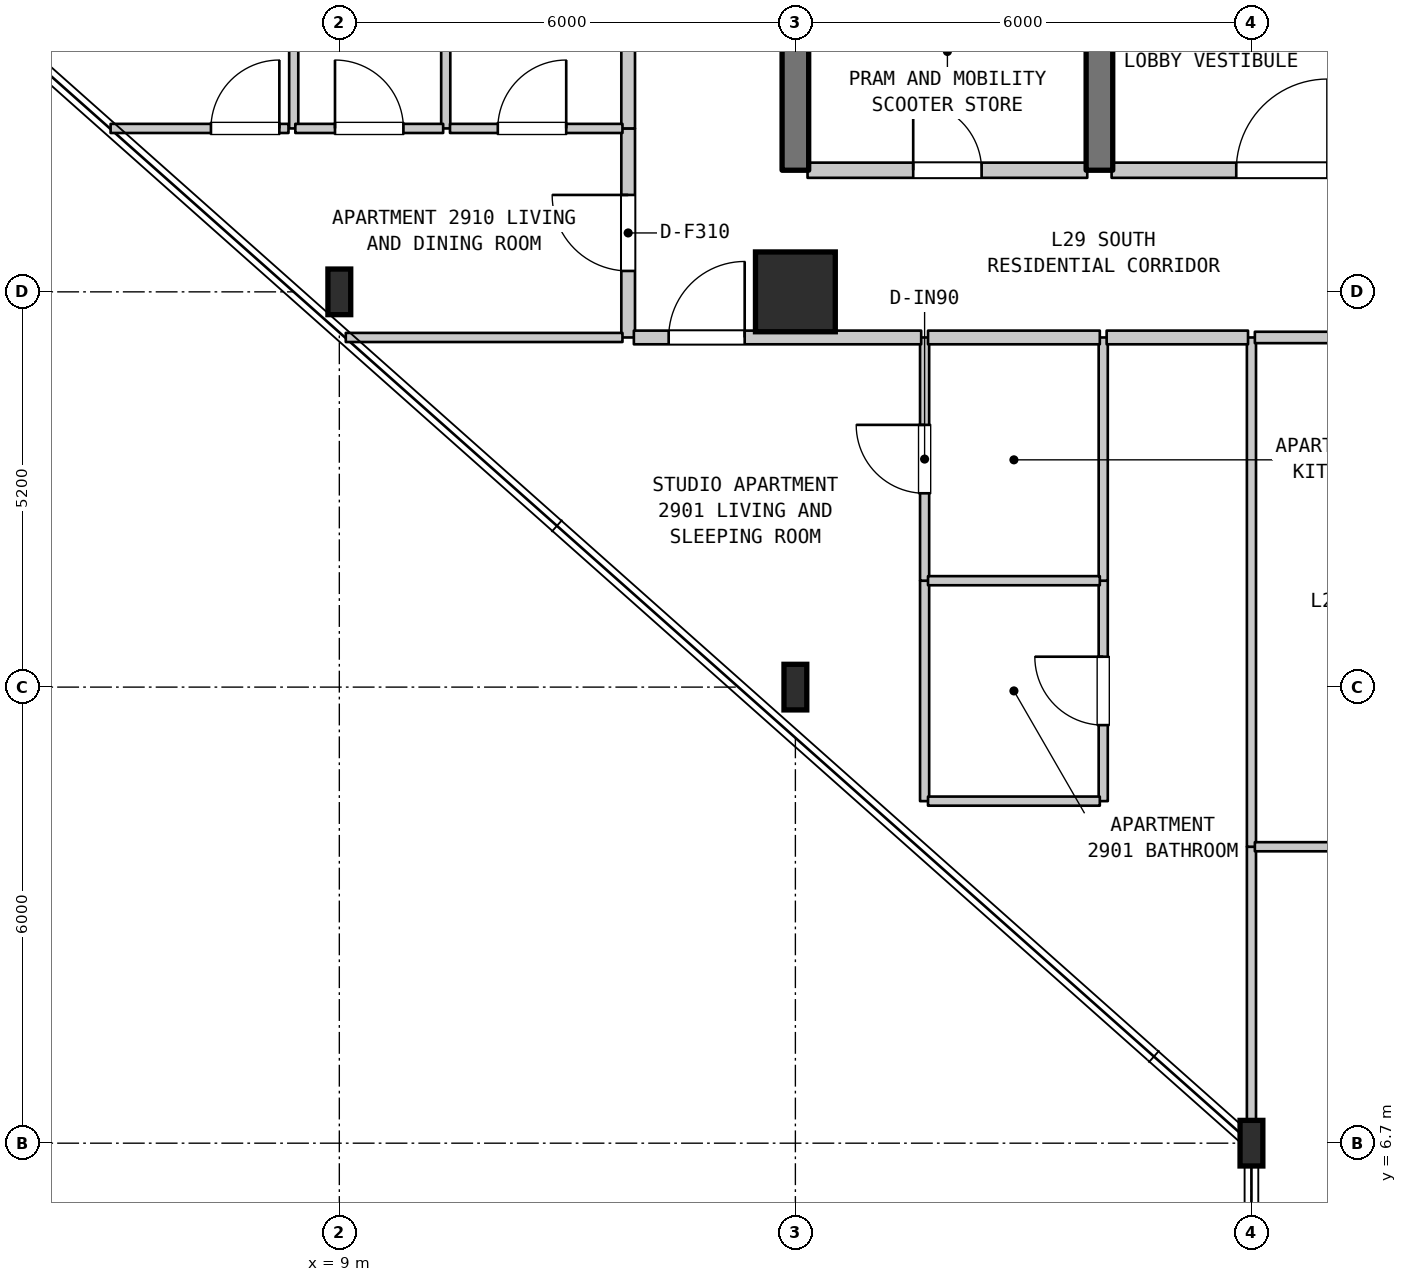
"""IFC4 building model, lengths in metres.
Left out: names, types, materials, properties, quantities, classifications, styles, units other than length and angle.
Written with IfcOpenShell. Run it as: python <this file> out.ifc"""

import sys

from ifc_helpers import new_model, si_unit, direction, frame, frame_2d, origin, origin_2d, place, context, subcontext, project, spatial, rectangle, i_section, extrude, element, fill, save


model = new_model("IFC4")
c1 = context("Model", 3, precision=1e-05, world=origin(), true_north=direction((0.0, 1.0)))
c2 = subcontext(c1, "Body", "Model", "MODEL_VIEW")
j1 = project(units=[si_unit("LENGTHUNIT", "METRE"), si_unit("PLANEANGLEUNIT", "RADIAN")], contexts=[c1])
p1 = place(None, origin())
s1 = spatial("IfcSite", under=j1, at=p1, CompositionType="ELEMENT")
p2 = place(p1, origin())
s2 = spatial("IfcBuilding", under=s1, at=p2, CompositionType="ELEMENT")
p3 = place(p2, frame((0.0, 0.0, 120.5)))
s3 = spatial("IfcBuildingStorey", under=s2, at=p3, CompositionType="ELEMENT", Elevation=120.5)
for number, where, z_axis, x_axis in (
    (1, (9.0, 17.9, 0.0), (0.0, 0.0, 1.0), (1.0, 0.0, 0.0)),
    (2, (15.0, 12.7, 0.0), (0.0, 0.0, 1.0), (1.0, 0.0, 0.0)),
):
    element("IfcColumn", number, at=place(p3, frame(where, z_axis=z_axis, x_axis=x_axis)), inside=s3, PredefinedType="COLUMN", context=c2, shape_type="SweptSolid", body=[
        extrude(i_section(OverallWidth=0.3, OverallDepth=0.6, WebThickness=0.015, FlangeThickness=0.03, FilletRadius=0.027, at=origin_2d()), origin(), (0.0, 0.0, 1.0), 4.8),
    ])
p4 = place(p3, frame((15.0, 17.9, 0.0), z_axis=(0.0, 0.0, 1.0), x_axis=(1.0, 0.0, 0.0)))
e3 = element("IfcColumn", 3, at=p4, inside=s3, PredefinedType="COLUMN", context=c2, shape_type="SweptSolid", body=[
    extrude(rectangle(XDim=1.05, YDim=1.05, at=origin_2d()), origin(), (0.0, 0.0, 1.0), 4.8),
])
p5 = place(p3, frame((21.0, 6.7, 0.0), z_axis=(0.0, 0.0, 1.0), x_axis=(1.0, 0.0, 0.0)))
e4 = element("IfcColumn", 4, at=p5, inside=s3, PredefinedType="COLUMN", context=c2, shape_type="SweptSolid", body=[
    extrude(i_section(OverallWidth=0.3, OverallDepth=0.6, WebThickness=0.015, FlangeThickness=0.03, FilletRadius=0.027, at=origin_2d()), origin(), (0.0, 0.0, 1.0), 4.8),
])
for number, where, z_axis, x_axis in (
    (5, (8.4, 20.05, 0.0), (0.0, 0.0, 1.0), (0.0, 1.0, 0.0)),
    (6, (10.4, 20.05, 0.0), (0.0, 0.0, 1.0), (0.0, 1.0, 0.0)),
):
    element("IfcWall", number, at=place(p3, frame(where, z_axis=z_axis, x_axis=x_axis)), inside=s3, PredefinedType="PARTITIONING", context=c2, shape_type="SweptSolid", body=[
        extrude(rectangle(XDim=5.46, YDim=0.12, at=frame_2d((2.73, 0.0))), origin(), (0.0, 0.0, 1.0), 4.48),
    ])
p6 = place(p3, frame((12.8, 17.3, 0.0), z_axis=(0.0, 0.0, 1.0), x_axis=(0.0, 1.0, 0.0)))
e7 = element("IfcWall", 7, at=p6, inside=s3, PredefinedType="STANDARD", context=c2, shape_type="SweptSolid", body=[
    extrude(rectangle(XDim=2.75, YDim=0.18, at=frame_2d((1.375, 0.0))), origin(), (0.0, 0.0, 1.0), 4.48),
])
p7 = place(p6, frame((0.875, 0.0, 0.0)))
e8 = element("IfcOpeningElement", 8, at=p7, cuts=e7, PredefinedType="OPENING", context=c2, shape_type="SweptSolid", body=[
    extrude(rectangle(XDim=1.0, YDim=2.15, at=frame_2d((0.5, 1.075))), frame((0.0, 0.1, 0.0), z_axis=(0.0, -1.0, 0.0), x_axis=(1.0, 0.0, 0.0)), (0.0, 0.0, 1.0), 0.2),
])
p8 = place(p3, frame((12.8, 20.05, 0.0), z_axis=(0.0, 0.0, 1.0), x_axis=(0.0, 1.0, 0.0)))
e9 = element("IfcWall", 9, at=p8, inside=s3, PredefinedType="STANDARD", context=c2, shape_type="SweptSolid", body=[
    extrude(rectangle(XDim=5.46, YDim=0.18, at=frame_2d((2.73, 0.0))), origin(), (0.0, 0.0, 1.0), 4.48),
])
p9 = place(p3, frame((15.0, 19.5, 0.0), z_axis=(0.0, 0.0, 1.0), x_axis=(0.0, 1.0, 0.0)))
e10 = element("IfcWall", 10, at=p9, inside=s3, PredefinedType="SHEAR", context=c2, shape_type="SweptSolid", body=[
    extrude(rectangle(XDim=3.2, YDim=0.35, at=frame_2d((1.6, 0.0))), origin(), (0.0, 0.0, 1.0), 4.48),
])
p10 = place(p3, frame((16.7, 11.2, 0.0), z_axis=(0.0, 0.0, 1.0), x_axis=(0.0, 1.0, 0.0)))
e11 = element("IfcWall", 11, at=p10, inside=s3, PredefinedType="PARTITIONING", context=c2, shape_type="SweptSolid", body=[
    extrude(rectangle(XDim=2.9, YDim=0.12, at=frame_2d((1.45, 0.0))), origin(), (0.0, 0.0, 1.0), 4.48),
])
p11 = place(p3, frame((16.7, 14.1, 0.0), z_axis=(0.0, 0.0, 1.0), x_axis=(0.0, 1.0, 0.0)))
e12 = element("IfcWall", 12, at=p11, inside=s3, PredefinedType="PARTITIONING", context=c2, shape_type="SweptSolid", body=[
    extrude(rectangle(XDim=3.2, YDim=0.12, at=frame_2d((1.6, 0.0))), origin(), (0.0, 0.0, 1.0), 4.48),
])
p12 = place(p11, frame((1.15, 0.0, 0.0)))
e13 = element("IfcOpeningElement", 13, at=p12, cuts=e12, PredefinedType="OPENING", context=c2, shape_type="SweptSolid", body=[
    extrude(rectangle(XDim=0.9, YDim=2.15, at=frame_2d((0.45, 1.075))), frame((0.0, 0.07, 0.0), z_axis=(0.0, -1.0, 0.0), x_axis=(1.0, 0.0, 0.0)), (0.0, 0.0, 1.0), 0.14),
])
p13 = place(p3, frame((19.0, 19.5, 0.0), z_axis=(0.0, 0.0, 1.0), x_axis=(0.0, 1.0, 0.0)))
e14 = element("IfcWall", 14, at=p13, inside=s3, PredefinedType="SHEAR", context=c2, shape_type="SweptSolid", body=[
    extrude(rectangle(XDim=3.2, YDim=0.35, at=frame_2d((1.6, 0.0))), origin(), (0.0, 0.0, 1.0), 4.48),
])
p14 = place(p3, frame((19.05, 11.2, 0.0), z_axis=(0.0, 0.0, 1.0), x_axis=(0.0, 1.0, 0.0)))
e15 = element("IfcWall", 15, at=p14, inside=s3, PredefinedType="PARTITIONING", context=c2, shape_type="SweptSolid", body=[
    extrude(rectangle(XDim=2.9, YDim=0.12, at=frame_2d((1.45, 0.0))), origin(), (0.0, 0.0, 1.0), 4.48),
])
p15 = place(p14, frame((1.0, 0.0, 0.0)))
e16 = element("IfcOpeningElement", 16, at=p15, cuts=e15, PredefinedType="OPENING", context=c2, shape_type="SweptSolid", body=[
    extrude(rectangle(XDim=0.9, YDim=2.1, at=frame_2d((0.45, 1.05))), frame((0.0, 0.07, 0.0), z_axis=(0.0, -1.0, 0.0), x_axis=(1.0, 0.0, 0.0)), (0.0, 0.0, 1.0), 0.14),
])
p16 = place(p3, frame((19.05, 14.1, 0.0), z_axis=(0.0, 0.0, 1.0), x_axis=(0.0, 1.0, 0.0)))
e17 = element("IfcWall", 17, at=p16, inside=s3, PredefinedType="PARTITIONING", context=c2, shape_type="SweptSolid", body=[
    extrude(rectangle(XDim=3.2, YDim=0.12, at=frame_2d((1.6, 0.0))), origin(), (0.0, 0.0, 1.0), 4.48),
])
p17 = place(p3, frame((21.0, 6.71, 0.0), z_axis=(0.0, 0.0, 1.0), x_axis=(0.0, 1.0, 0.0)))
e18 = element("IfcWall", 18, at=p17, inside=s3, PredefinedType="PARTITIONING", context=c2, shape_type="SweptSolid", body=[
    extrude(rectangle(XDim=3.89, YDim=0.12, at=frame_2d((1.945, 0.0))), origin(), (0.0, 0.0, 1.0), 4.48),
])
p18 = place(p3, frame((21.0, 10.6, 0.0), z_axis=(0.0, 0.0, 1.0), x_axis=(0.0, 1.0, 0.0)))
e19 = element("IfcWall", 19, at=p18, inside=s3, PredefinedType="PARTITIONING", context=c2, shape_type="SweptSolid", body=[
    extrude(rectangle(XDim=6.7, YDim=0.12, at=frame_2d((3.35, 0.0))), origin(), (0.0, 0.0, 1.0), 4.48),
])
p19 = place(p3, frame((21.045, 10.6, 0.0), z_axis=(0.0, 0.0, 1.0), x_axis=(1.0, 0.0, 0.0)))
e20 = element("IfcWall", 20, at=p19, inside=s3, PredefinedType="PARTITIONING", context=c2, shape_type="SweptSolid", body=[
    extrude(rectangle(XDim=3.91, YDim=0.12, at=frame_2d((1.955, 0.0))), origin(), (0.0, 0.0, 1.0), 4.48),
])
for number, where, z_axis, x_axis in (
    (21, (16.745, 11.2, 0.0), (0.0, 0.0, 1.0), (1.0, 0.0, 0.0)),
    (22, (16.745, 14.1, 0.0), (0.0, 0.0, 1.0), (1.0, 0.0, 0.0)),
):
    element("IfcWall", number, at=place(p3, frame(where, z_axis=z_axis, x_axis=x_axis)), inside=s3, PredefinedType="PARTITIONING", context=c2, shape_type="SweptSolid", body=[
        extrude(rectangle(XDim=2.26, YDim=0.12, at=frame_2d((1.13, 0.0))), origin(), (0.0, 0.0, 1.0), 4.48),
    ])
p20 = place(p3, frame((9.085, 17.3, 0.0), z_axis=(0.0, 0.0, 1.0), x_axis=(1.0, 0.0, 0.0)))
e23 = element("IfcWall", 23, at=p20, inside=s3, PredefinedType="PARTITIONING", context=c2, shape_type="SweptSolid", body=[
    extrude(rectangle(XDim=3.64, YDim=0.12, at=frame_2d((1.82, 0.0))), origin(), (0.0, 0.0, 1.0), 4.48),
])
p21 = place(p3, frame((12.875, 17.3, 0.0), z_axis=(0.0, 0.0, 1.0), x_axis=(1.0, 0.0, 0.0)))
e24 = element("IfcWall", 24, at=p21, inside=s3, PredefinedType="STANDARD", context=c2, shape_type="SweptSolid", body=[
    extrude(rectangle(XDim=3.78, YDim=0.18, at=frame_2d((1.89, 0.0))), origin(), (0.0, 0.0, 1.0), 4.48),
])
p22 = place(p21, frame((0.458, 0.0, 0.0)))
e25 = element("IfcOpeningElement", 25, at=p22, cuts=e24, PredefinedType="OPENING", context=c2, shape_type="SweptSolid", body=[
    extrude(rectangle(XDim=1.0, YDim=2.15, at=frame_2d((0.5, 1.075))), frame((0.0, 0.1, 0.0), z_axis=(0.0, -1.0, 0.0), x_axis=(1.0, 0.0, 0.0)), (0.0, 0.0, 1.0), 0.2),
])
p23 = place(p3, frame((16.745, 17.3, 0.0), z_axis=(0.0, 0.0, 1.0), x_axis=(1.0, 0.0, 0.0)))
e26 = element("IfcWall", 26, at=p23, inside=s3, PredefinedType="STANDARD", context=c2, shape_type="SweptSolid", body=[
    extrude(rectangle(XDim=2.26, YDim=0.18, at=frame_2d((1.13, 0.0))), origin(), (0.0, 0.0, 1.0), 4.48),
])
p24 = place(p3, frame((19.095, 17.3, 0.0), z_axis=(0.0, 0.0, 1.0), x_axis=(1.0, 0.0, 0.0)))
e27 = element("IfcWall", 27, at=p24, inside=s3, PredefinedType="STANDARD", context=c2, shape_type="SweptSolid", body=[
    extrude(rectangle(XDim=1.86, YDim=0.18, at=frame_2d((0.93, 0.0))), origin(), (0.0, 0.0, 1.0), 4.48),
])
p25 = place(p3, frame((21.045, 17.3, 0.0), z_axis=(0.0, 0.0, 1.0), x_axis=(1.0, 0.0, 0.0)))
e28 = element("IfcWall", 28, at=p25, inside=s3, PredefinedType="STANDARD", context=c2, shape_type="SweptSolid", body=[
    extrude(rectangle(XDim=3.91, YDim=0.15, at=frame_2d((1.955, 0.0))), origin(), (0.0, 0.0, 1.0), 4.48),
])
p26 = place(p25, frame((1.455, 0.0, 0.0)))
e29 = element("IfcOpeningElement", 29, at=p26, cuts=e28, PredefinedType="OPENING", context=c2, shape_type="SweptSolid", body=[
    extrude(rectangle(XDim=1.0, YDim=2.15, at=frame_2d((0.5, 1.075))), frame((0.0, 0.085, 0.0), z_axis=(0.0, -1.0, 0.0), x_axis=(1.0, 0.0, 0.0)), (0.0, 0.0, 1.0), 0.17),
])
p27 = place(p3, frame((15.16, 19.5, 0.0), z_axis=(0.0, 0.0, 1.0), x_axis=(1.0, 0.0, 0.0)))
e30 = element("IfcWall", 30, at=p27, inside=s3, PredefinedType="STANDARD", context=c2, shape_type="SweptSolid", body=[
    extrude(rectangle(XDim=3.68, YDim=0.2, at=frame_2d((1.84, 0.0))), origin(), (0.0, 0.0, 1.0), 4.48),
])
p28 = place(p27, frame((1.39, 0.0, 0.0)))
e31 = element("IfcOpeningElement", 31, at=p28, cuts=e30, PredefinedType="OPENING", context=c2, shape_type="SweptSolid", body=[
    extrude(rectangle(XDim=0.9, YDim=2.15, at=frame_2d((0.45, 1.075))), frame((0.0, 0.11, 0.0), z_axis=(0.0, -1.0, 0.0), x_axis=(1.0, 0.0, 0.0)), (0.0, 0.0, 1.0), 0.22),
])
p29 = place(p3, frame((19.16, 19.5, 0.0), z_axis=(0.0, 0.0, 1.0), x_axis=(1.0, 0.0, 0.0)))
e32 = element("IfcWall", 32, at=p29, inside=s3, PredefinedType="STANDARD", context=c2, shape_type="SweptSolid", body=[
    extrude(rectangle(XDim=4.48, YDim=0.2, at=frame_2d((2.24, 0.0))), origin(), (0.0, 0.0, 1.0), 4.48),
])
p30 = place(p29, frame((1.64, 0.0, 0.0)))
e33 = element("IfcOpeningElement", 33, at=p30, cuts=e32, PredefinedType="OPENING", context=c2, shape_type="SweptSolid", body=[
    extrude(rectangle(XDim=1.2, YDim=2.2, at=frame_2d((0.6, 1.1))), frame((0.0, 0.11, 0.0), z_axis=(0.0, -1.0, 0.0), x_axis=(1.0, 0.0, 0.0)), (0.0, 0.0, 1.0), 0.22),
])
p31 = place(p3, frame((5.991, 20.05, 0.0), z_axis=(0.0, 0.0, 1.0), x_axis=(1.0, 0.0, 0.0)))
e34 = element("IfcWall", 34, at=p31, inside=s3, PredefinedType="PARTITIONING", context=c2, shape_type="SweptSolid", body=[
    extrude(rectangle(XDim=2.34, YDim=0.12, at=frame_2d((1.17, 0.0))), origin(), (0.0, 0.0, 1.0), 4.48),
])
p32 = place(p31, frame((1.32, 0.0, 0.0)))
e35 = element("IfcOpeningElement", 35, at=p32, cuts=e34, PredefinedType="OPENING", context=c2, shape_type="SweptSolid", body=[
    extrude(rectangle(XDim=0.9, YDim=2.15, at=frame_2d((0.45, 1.075))), frame((0.0, 0.07, 0.0), z_axis=(0.0, -1.0, 0.0), x_axis=(1.0, 0.0, 0.0)), (0.0, 0.0, 1.0), 0.14),
])
p33 = place(p3, frame((8.421, 20.05, 0.0), z_axis=(0.0, 0.0, 1.0), x_axis=(1.0, 0.0, 0.0)))
e36 = element("IfcWall", 36, at=p33, inside=s3, PredefinedType="PARTITIONING", context=c2, shape_type="SweptSolid", body=[
    extrude(rectangle(XDim=1.945, YDim=0.12, at=frame_2d((0.973, 0.0))), origin(), (0.0, 0.0, 1.0), 4.48),
])
p34 = place(p33, frame((0.522, 0.0, 0.0)))
e37 = element("IfcOpeningElement", 37, at=p34, cuts=e36, PredefinedType="OPENING", context=c2, shape_type="SweptSolid", body=[
    extrude(rectangle(XDim=0.9, YDim=2.15, at=frame_2d((0.45, 1.075))), frame((0.0, 0.07, 0.0), z_axis=(0.0, -1.0, 0.0), x_axis=(1.0, 0.0, 0.0)), (0.0, 0.0, 1.0), 0.14),
])
p35 = place(p3, frame((10.456, 20.05, 0.0), z_axis=(0.0, 0.0, 1.0), x_axis=(1.0, 0.0, 0.0)))
e38 = element("IfcWall", 38, at=p35, inside=s3, PredefinedType="PARTITIONING", context=c2, shape_type="SweptSolid", body=[
    extrude(rectangle(XDim=2.269, YDim=0.12, at=frame_2d((1.135, 0.0))), origin(), (0.0, 0.0, 1.0), 4.48),
])
p36 = place(p35, frame((0.629, 0.0, 0.0)))
e39 = element("IfcOpeningElement", 39, at=p36, cuts=e38, PredefinedType="OPENING", context=c2, shape_type="SweptSolid", body=[
    extrude(rectangle(XDim=0.9, YDim=2.1, at=frame_2d((0.45, 1.05))), frame((0.0, 0.07, 0.0), z_axis=(0.0, -1.0, 0.0), x_axis=(1.0, 0.0, 0.0)), (0.0, 0.0, 1.0), 0.14),
])
p37 = place(p7, origin())
e40 = element("IfcDoor", 40, at=p37, inside=s3, OperationType="SINGLE_SWING_RIGHT", PredefinedType="DOOR", context=c2, shape_type="SweptSolid", body=[
    extrude(rectangle(XDim=1.0, YDim=2.15, at=frame_2d((0.5, 1.075))), frame((0.0, 0.025, 0.0), z_axis=(0.0, -1.0, 0.0), x_axis=(1.0, 0.0, 0.0)), (0.0, 0.0, 1.0), 0.05),
])
fill(e8, e40)
p38 = place(p12, origin())
e41 = element("IfcDoor", 41, at=p38, inside=s3, OperationType="SINGLE_SWING_RIGHT", PredefinedType="DOOR", context=c2, shape_type="SweptSolid", body=[
    extrude(rectangle(XDim=0.9, YDim=2.15, at=frame_2d((0.45, 1.075))), frame((0.0, 0.025, 0.0), z_axis=(0.0, -1.0, 0.0), x_axis=(1.0, 0.0, 0.0)), (0.0, 0.0, 1.0), 0.05),
])
fill(e13, e41)
p39 = place(p15, origin())
e42 = element("IfcDoor", 42, at=p39, inside=s3, OperationType="SINGLE_SWING_RIGHT", PredefinedType="DOOR", context=c2, shape_type="SweptSolid", body=[
    extrude(rectangle(XDim=0.9, YDim=2.1, at=frame_2d((0.45, 1.05))), frame((0.0, 0.025, 0.0), z_axis=(0.0, -1.0, 0.0), x_axis=(1.0, 0.0, 0.0)), (0.0, 0.0, 1.0), 0.05),
])
fill(e16, e42)
p40 = place(p22, origin())
e43 = element("IfcDoor", 43, at=p40, inside=s3, OperationType="SINGLE_SWING_RIGHT", PredefinedType="DOOR", context=c2, shape_type="SweptSolid", body=[
    extrude(rectangle(XDim=1.0, YDim=2.15, at=frame_2d((0.5, 1.075))), frame((0.0, 0.025, 0.0), z_axis=(0.0, -1.0, 0.0), x_axis=(1.0, 0.0, 0.0)), (0.0, 0.0, 1.0), 0.05),
])
fill(e25, e43)
p41 = place(p28, origin())
e44 = element("IfcDoor", 44, at=p41, inside=s3, OperationType="SINGLE_SWING_LEFT", PredefinedType="DOOR", context=c2, shape_type="SweptSolid", body=[
    extrude(rectangle(XDim=0.9, YDim=2.15, at=frame_2d((0.45, 1.075))), frame((0.0, 0.025, 0.0), z_axis=(0.0, -1.0, 0.0), x_axis=(1.0, 0.0, 0.0)), (0.0, 0.0, 1.0), 0.05),
])
fill(e31, e44)
p42 = place(p30, origin())
e45 = element("IfcDoor", 45, at=p42, inside=s3, OperationType="SINGLE_SWING_RIGHT", PredefinedType="DOOR", context=c2, shape_type="SweptSolid", body=[
    extrude(rectangle(XDim=1.2, YDim=2.2, at=frame_2d((0.6, 1.1))), frame((0.0, 0.025, 0.0), z_axis=(0.0, -1.0, 0.0), x_axis=(1.0, 0.0, 0.0)), (0.0, 0.0, 1.0), 0.05),
])
fill(e33, e45)
p43 = place(p32, origin())
e46 = element("IfcDoor", 46, at=p43, inside=s3, OperationType="SINGLE_SWING_RIGHT", PredefinedType="DOOR", context=c2, shape_type="SweptSolid", body=[
    extrude(rectangle(XDim=0.9, YDim=2.15, at=frame_2d((0.45, 1.075))), frame((0.0, 0.025, 0.0), z_axis=(0.0, -1.0, 0.0), x_axis=(1.0, 0.0, 0.0)), (0.0, 0.0, 1.0), 0.05),
])
fill(e35, e46)
p44 = place(p34, origin())
e47 = element("IfcDoor", 47, at=p44, inside=s3, OperationType="SINGLE_SWING_LEFT", PredefinedType="DOOR", context=c2, shape_type="SweptSolid", body=[
    extrude(rectangle(XDim=0.9, YDim=2.15, at=frame_2d((0.45, 1.075))), frame((0.0, 0.025, 0.0), z_axis=(0.0, -1.0, 0.0), x_axis=(1.0, 0.0, 0.0)), (0.0, 0.0, 1.0), 0.05),
])
fill(e37, e47)
p45 = place(p36, origin())
e48 = element("IfcDoor", 48, at=p45, inside=s3, OperationType="SINGLE_SWING_RIGHT", PredefinedType="DOOR", context=c2, shape_type="SweptSolid", body=[
    extrude(rectangle(XDim=0.9, YDim=2.1, at=frame_2d((0.45, 1.05))), frame((0.0, 0.025, 0.0), z_axis=(0.0, -1.0, 0.0), x_axis=(1.0, 0.0, 0.0)), (0.0, 0.0, 1.0), 0.05),
])
fill(e39, e48)
save(model, sys.argv[1])
